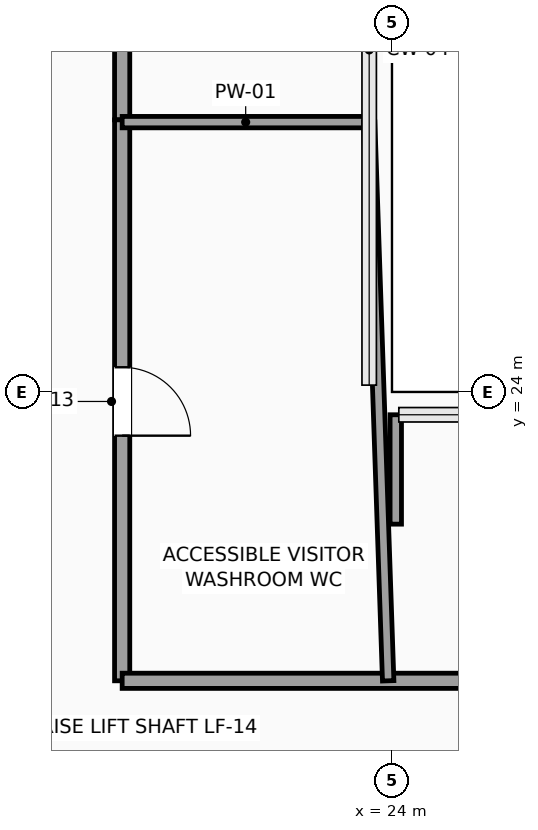
"""IFC4 building model, lengths in metres.
Left out: names, types, materials, properties, quantities, classifications, styles, units other than length and angle.
Written with IfcOpenShell. Run it as: python <this file> out.ifc"""

import sys

from ifc_helpers import new_model, si_unit, direction, frame, frame_2d, origin, place, context, subcontext, project, spatial, rectangle, extrude, element, fill, save


model = new_model("IFC4")
c1 = context("Model", 3, precision=1e-05, world=origin(), true_north=direction((0.0, 1.0)))
c2 = subcontext(c1, "Body", "Model", "MODEL_VIEW")
j1 = project(units=[si_unit("LENGTHUNIT", "METRE"), si_unit("PLANEANGLEUNIT", "RADIAN")], contexts=[c1])
p1 = place(None, origin())
s1 = spatial("IfcSite", under=j1, at=p1, CompositionType="ELEMENT")
p2 = place(p1, origin())
s2 = spatial("IfcBuilding", under=s1, at=p2, CompositionType="ELEMENT")
p3 = place(p2, frame((0.0, 0.0, 223.65)))
s3 = spatial("IfcBuildingStorey", under=s2, at=p3, CompositionType="ELEMENT", Elevation=223.65)
p4 = place(p3, frame((20.45, 30.25, 0.0), z_axis=(0.0, 0.0, 1.0), x_axis=(0.0, -1.0, 0.0)))
e1 = element("IfcWall", 1, at=p4, inside=s3, PredefinedType="SOLIDWALL", context=c2, shape_type="SweptSolid", body=[
    extrude(rectangle(XDim=2.67, YDim=0.2, at=frame_2d((1.335, 0.0))), origin(), (0.0, 0.0, 1.0), 3.54),
])
p5 = place(p3, frame((20.45, 27.58, 0.0), z_axis=(0.0, 0.0, 1.0), x_axis=(0.0, -1.0, 0.0)))
e2 = element("IfcWall", 2, at=p5, inside=s3, PredefinedType="SOLIDWALL", context=c2, shape_type="SweptSolid", body=[
    extrude(rectangle(XDim=7.38, YDim=0.2, at=frame_2d((3.69, 0.0))), origin(), (0.0, 0.0, 1.0), 3.54),
])
p6 = place(p5, frame((3.255, 0.0, 0.0)))
e3 = element("IfcOpeningElement", 3, at=p6, cuts=e2, PredefinedType="OPENING", context=c2, shape_type="SweptSolid", body=[
    extrude(rectangle(XDim=0.9, YDim=2.1, at=frame_2d((0.45, 1.05))), frame((0.0, 0.11, 0.0), z_axis=(0.0, -1.0, 0.0), x_axis=(1.0, 0.0, 0.0)), (0.0, 0.0, 1.0), 0.22),
])
p7 = place(p3, frame((20.45, 20.2, 0.0), z_axis=(0.0, 0.0, 1.0), x_axis=(1.0, 0.0, 0.0)))
e4 = element("IfcWall", 4, at=p7, inside=s3, PredefinedType="SOLIDWALL", context=c2, shape_type="SweptSolid", body=[
    extrude(rectangle(XDim=15.7, YDim=0.2, at=frame_2d((7.85, 0.0))), origin(), (0.0, 0.0, 1.0), 3.54),
])
p8 = place(p7, frame((7.875, 0.0, 0.0)))
e5 = element("IfcOpeningElement", 5, at=p8, cuts=e4, PredefinedType="OPENING", context=c2, shape_type="SweptSolid", body=[
    extrude(rectangle(XDim=0.95, YDim=2.15, at=frame_2d((0.475, 1.075))), frame((0.0, 0.11, 0.0), z_axis=(0.0, -1.0, 0.0), x_axis=(1.0, 0.0, 0.0)), (0.0, 0.0, 1.0), 0.22),
])
p9 = place(p3, frame((20.45, 27.55, 0.0), z_axis=(0.0, 0.0, 1.0), x_axis=(1.0, 0.0, 0.0)))
e6 = element("IfcWall", 6, at=p9, inside=s3, PredefinedType="PARTITIONING", context=c2, shape_type="SweptSolid", body=[
    extrude(rectangle(XDim=3.25, YDim=0.15, at=frame_2d((1.625, 0.0))), origin(), (0.0, 0.0, 1.0), 3.54),
])
p10 = place(p3, frame((23.95, 20.2, 0.0), z_axis=(0.0, 0.0, 1.0), x_axis=(-0.033993495762, 0.999422054112, 0.0)))
e7 = element("IfcWall", 7, at=p10, inside=s3, PredefinedType="PARTITIONING", context=c2, shape_type="SweptSolid", body=[
    extrude(rectangle(XDim=7.354, YDim=0.15, at=frame_2d((3.677, 0.0))), origin(), (0.0, 0.0, 1.0), 3.54),
])
p11 = place(p3, frame((24.05, 22.261, 0.0), z_axis=(0.0, 0.0, 1.0), x_axis=(0.0, 1.0, 0.0)))
e8 = element("IfcWall", 8, at=p11, inside=s3, PredefinedType="PARTITIONING", context=c2, shape_type="SweptSolid", body=[
    extrude(rectangle(XDim=1.439, YDim=0.15, at=frame_2d((0.719, 0.0))), origin(), (0.0, 0.0, 1.0), 3.54),
])
p12 = place(p6, origin())
e9 = element("IfcDoor", 9, at=p12, inside=s3, OperationType="SINGLE_SWING_RIGHT", PredefinedType="DOOR", context=c2, shape_type="SweptSolid", body=[
    extrude(rectangle(XDim=0.9, YDim=2.1, at=frame_2d((0.45, 1.05))), frame((0.0, 0.025, 0.0), z_axis=(0.0, -1.0, 0.0), x_axis=(1.0, 0.0, 0.0)), (0.0, 0.0, 1.0), 0.05),
])
fill(e3, e9)
save(model, sys.argv[1])
